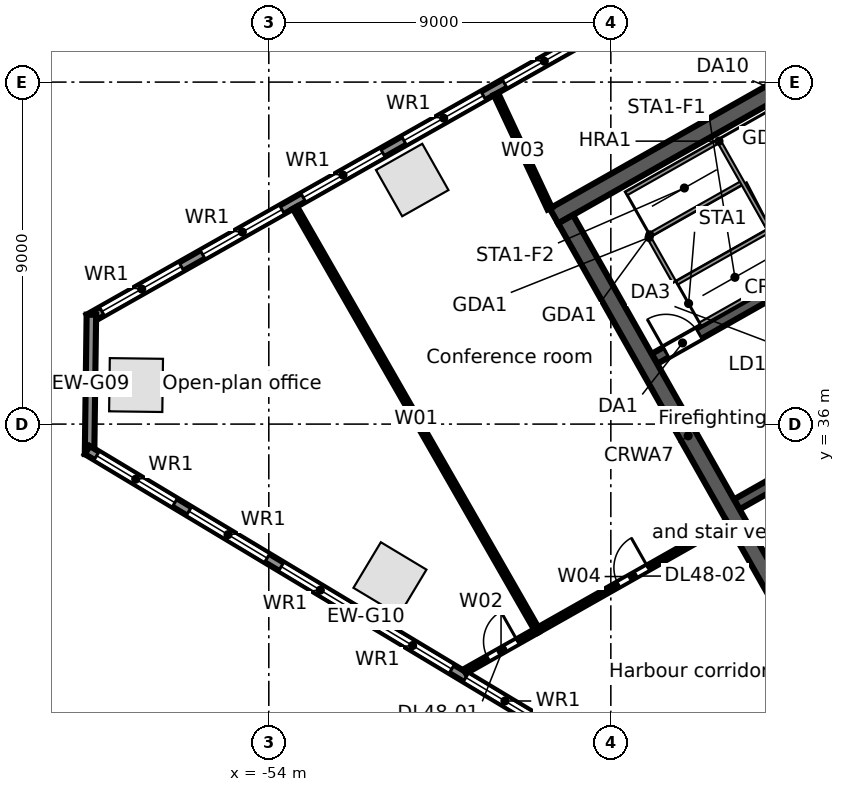
"""IFC4 building model, lengths in metres.
Left out: names, types, materials, properties, quantities, classifications, styles, units other than length and angle.
Written with IfcOpenShell. Run it as: python <this file> out.ifc"""

import sys

from ifc_helpers import new_model, si_unit, direction, frame, frame_2d, origin, origin_2d, place, context, subcontext, project, spatial, rectangle, extrude, element, fill, save


model = new_model("IFC4")
c1 = context("Model", 3, precision=1e-05, world=origin(), true_north=direction((0.0, 1.0)))
c2 = subcontext(c1, "Body", "Model", "MODEL_VIEW")
j1 = project(units=[si_unit("LENGTHUNIT", "METRE"), si_unit("PLANEANGLEUNIT", "RADIAN")], contexts=[c1])
p1 = place(None, origin())
s1 = spatial("IfcSite", under=j1, at=p1, CompositionType="ELEMENT")
p2 = place(p1, origin())
s2 = spatial("IfcBuilding", under=s1, at=p2, CompositionType="ELEMENT")
p3 = place(p2, frame((0.0, 0.0, 227.0)))
s3 = spatial("IfcBuildingStorey", under=s2, at=p3, CompositionType="ELEMENT", Elevation=227.0)
for number, where, z_axis, x_axis in (
    (1, (-50.226, 42.423, 0.0), (0.0, 0.0, 1.0), (-0.87, -0.492, 0.0)),
    (2, (-57.493, 37.027, 0.0), (0.0, 0.0, 1.0), (-0.013, -1.0, 0.0)),
    (3, (-50.812, 31.931, 0.0), (0.0, 0.0, 1.0), (0.857, -0.515, 0.0)),
):
    element("IfcColumn", number, at=place(p3, frame(where, z_axis=z_axis, x_axis=x_axis)), inside=s3, PredefinedType="COLUMN", context=c2, shape_type="SweptSolid", body=[
        extrude(rectangle(XDim=1.4, YDim=1.4, at=origin_2d()), origin(), (0.0, 0.0, 1.0), 3.9),
    ])
p4 = place(p3, frame((-58.732, 38.771, 0.0), z_axis=(0.0, 0.0, 1.0), x_axis=(0.870354824205, 0.492425100887, 0.0)))
e4 = element("IfcWall", 4, at=p4, inside=s3, PredefinedType="STANDARD", context=c2, shape_type="SweptSolid", body=[
    extrude(rectangle(XDim=64.006, YDim=0.25, at=frame_2d((32.003, 0.0))), origin(), (0.0, 0.0, 1.0), 3.55),
])
p5 = place(p4, frame((61.259, 0.0, 0.8)))
e5 = element("IfcOpeningElement", 5, at=p5, cuts=e4, PredefinedType="OPENING", context=c2, shape_type="SweptSolid", body=[
    extrude(rectangle(XDim=2.4, YDim=2.2, at=frame_2d((1.2, 1.1))), frame((0.0, 0.135, 0.0), z_axis=(0.0, -1.0, 0.0), x_axis=(1.0, 0.0, 0.0)), (0.0, 0.0, 1.0), 0.27),
])
p6 = place(p4, frame((58.216, 0.0, 0.8)))
e6 = element("IfcOpeningElement", 6, at=p6, cuts=e4, PredefinedType="OPENING", context=c2, shape_type="SweptSolid", body=[
    extrude(rectangle(XDim=2.4, YDim=2.2, at=frame_2d((1.2, 1.1))), frame((0.0, 0.135, 0.0), z_axis=(0.0, -1.0, 0.0), x_axis=(1.0, 0.0, 0.0)), (0.0, 0.0, 1.0), 0.27),
])
p7 = place(p4, frame((55.173, 0.0, 0.8)))
e7 = element("IfcOpeningElement", 7, at=p7, cuts=e4, PredefinedType="OPENING", context=c2, shape_type="SweptSolid", body=[
    extrude(rectangle(XDim=2.4, YDim=2.2, at=frame_2d((1.2, 1.1))), frame((0.0, 0.135, 0.0), z_axis=(0.0, -1.0, 0.0), x_axis=(1.0, 0.0, 0.0)), (0.0, 0.0, 1.0), 0.27),
])
p8 = place(p4, frame((52.129, 0.0, 0.8)))
e8 = element("IfcOpeningElement", 8, at=p8, cuts=e4, PredefinedType="OPENING", context=c2, shape_type="SweptSolid", body=[
    extrude(rectangle(XDim=2.4, YDim=2.2, at=frame_2d((1.2, 1.1))), frame((0.0, 0.135, 0.0), z_axis=(0.0, -1.0, 0.0), x_axis=(1.0, 0.0, 0.0)), (0.0, 0.0, 1.0), 0.27),
])
p9 = place(p4, frame((49.086, 0.0, 0.8)))
e9 = element("IfcOpeningElement", 9, at=p9, cuts=e4, PredefinedType="OPENING", context=c2, shape_type="SweptSolid", body=[
    extrude(rectangle(XDim=2.4, YDim=2.2, at=frame_2d((1.2, 1.1))), frame((0.0, 0.135, 0.0), z_axis=(0.0, -1.0, 0.0), x_axis=(1.0, 0.0, 0.0)), (0.0, 0.0, 1.0), 0.27),
])
p10 = place(p4, frame((46.043, 0.0, 0.8)))
e10 = element("IfcOpeningElement", 10, at=p10, cuts=e4, PredefinedType="OPENING", context=c2, shape_type="SweptSolid", body=[
    extrude(rectangle(XDim=2.4, YDim=2.2, at=frame_2d((1.2, 1.1))), frame((0.0, 0.135, 0.0), z_axis=(0.0, -1.0, 0.0), x_axis=(1.0, 0.0, 0.0)), (0.0, 0.0, 1.0), 0.27),
])
p11 = place(p4, frame((43.0, 0.0, 0.8)))
e11 = element("IfcOpeningElement", 11, at=p11, cuts=e4, PredefinedType="OPENING", context=c2, shape_type="SweptSolid", body=[
    extrude(rectangle(XDim=2.4, YDim=2.2, at=frame_2d((1.2, 1.1))), frame((0.0, 0.135, 0.0), z_axis=(0.0, -1.0, 0.0), x_axis=(1.0, 0.0, 0.0)), (0.0, 0.0, 1.0), 0.27),
])
p12 = place(p4, frame((39.956, 0.0, 0.8)))
e12 = element("IfcOpeningElement", 12, at=p12, cuts=e4, PredefinedType="OPENING", context=c2, shape_type="SweptSolid", body=[
    extrude(rectangle(XDim=2.4, YDim=2.2, at=frame_2d((1.2, 1.1))), frame((0.0, 0.135, 0.0), z_axis=(0.0, -1.0, 0.0), x_axis=(1.0, 0.0, 0.0)), (0.0, 0.0, 1.0), 0.27),
])
p13 = place(p4, frame((36.913, 0.0, 0.8)))
e13 = element("IfcOpeningElement", 13, at=p13, cuts=e4, PredefinedType="OPENING", context=c2, shape_type="SweptSolid", body=[
    extrude(rectangle(XDim=2.4, YDim=2.2, at=frame_2d((1.2, 1.1))), frame((0.0, 0.135, 0.0), z_axis=(0.0, -1.0, 0.0), x_axis=(1.0, 0.0, 0.0)), (0.0, 0.0, 1.0), 0.27),
])
p14 = place(p4, frame((33.87, 0.0, 0.8)))
e14 = element("IfcOpeningElement", 14, at=p14, cuts=e4, PredefinedType="OPENING", context=c2, shape_type="SweptSolid", body=[
    extrude(rectangle(XDim=2.4, YDim=2.2, at=frame_2d((1.2, 1.1))), frame((0.0, 0.135, 0.0), z_axis=(0.0, -1.0, 0.0), x_axis=(1.0, 0.0, 0.0)), (0.0, 0.0, 1.0), 0.27),
])
p15 = place(p4, frame((30.826, 0.0, 0.8)))
e15 = element("IfcOpeningElement", 15, at=p15, cuts=e4, PredefinedType="OPENING", context=c2, shape_type="SweptSolid", body=[
    extrude(rectangle(XDim=2.4, YDim=2.2, at=frame_2d((1.2, 1.1))), frame((0.0, 0.135, 0.0), z_axis=(0.0, -1.0, 0.0), x_axis=(1.0, 0.0, 0.0)), (0.0, 0.0, 1.0), 0.27),
])
p16 = place(p4, frame((27.783, 0.0, 0.8)))
e16 = element("IfcOpeningElement", 16, at=p16, cuts=e4, PredefinedType="OPENING", context=c2, shape_type="SweptSolid", body=[
    extrude(rectangle(XDim=2.4, YDim=2.2, at=frame_2d((1.2, 1.1))), frame((0.0, 0.135, 0.0), z_axis=(0.0, -1.0, 0.0), x_axis=(1.0, 0.0, 0.0)), (0.0, 0.0, 1.0), 0.27),
])
p17 = place(p4, frame((24.74, 0.0, 0.8)))
e17 = element("IfcOpeningElement", 17, at=p17, cuts=e4, PredefinedType="OPENING", context=c2, shape_type="SweptSolid", body=[
    extrude(rectangle(XDim=2.4, YDim=2.2, at=frame_2d((1.2, 1.1))), frame((0.0, 0.135, 0.0), z_axis=(0.0, -1.0, 0.0), x_axis=(1.0, 0.0, 0.0)), (0.0, 0.0, 1.0), 0.27),
])
p18 = place(p4, frame((21.696, 0.0, 0.8)))
e18 = element("IfcOpeningElement", 18, at=p18, cuts=e4, PredefinedType="OPENING", context=c2, shape_type="SweptSolid", body=[
    extrude(rectangle(XDim=2.4, YDim=2.2, at=frame_2d((1.2, 1.1))), frame((0.0, 0.135, 0.0), z_axis=(0.0, -1.0, 0.0), x_axis=(1.0, 0.0, 0.0)), (0.0, 0.0, 1.0), 0.27),
])
p19 = place(p4, frame((18.653, 0.0, 0.8)))
e19 = element("IfcOpeningElement", 19, at=p19, cuts=e4, PredefinedType="OPENING", context=c2, shape_type="SweptSolid", body=[
    extrude(rectangle(XDim=2.4, YDim=2.2, at=frame_2d((1.2, 1.1))), frame((0.0, 0.135, 0.0), z_axis=(0.0, -1.0, 0.0), x_axis=(1.0, 0.0, 0.0)), (0.0, 0.0, 1.0), 0.27),
])
p20 = place(p4, frame((15.61, 0.0, 0.8)))
e20 = element("IfcOpeningElement", 20, at=p20, cuts=e4, PredefinedType="OPENING", context=c2, shape_type="SweptSolid", body=[
    extrude(rectangle(XDim=2.4, YDim=2.2, at=frame_2d((1.2, 1.1))), frame((0.0, 0.135, 0.0), z_axis=(0.0, -1.0, 0.0), x_axis=(1.0, 0.0, 0.0)), (0.0, 0.0, 1.0), 0.27),
])
p21 = place(p4, frame((12.567, 0.0, 0.8)))
e21 = element("IfcOpeningElement", 21, at=p21, cuts=e4, PredefinedType="OPENING", context=c2, shape_type="SweptSolid", body=[
    extrude(rectangle(XDim=2.4, YDim=2.2, at=frame_2d((1.2, 1.1))), frame((0.0, 0.135, 0.0), z_axis=(0.0, -1.0, 0.0), x_axis=(1.0, 0.0, 0.0)), (0.0, 0.0, 1.0), 0.27),
])
p22 = place(p4, frame((9.523, 0.0, 0.8)))
e22 = element("IfcOpeningElement", 22, at=p22, cuts=e4, PredefinedType="OPENING", context=c2, shape_type="SweptSolid", body=[
    extrude(rectangle(XDim=2.4, YDim=2.2, at=frame_2d((1.2, 1.1))), frame((0.0, 0.135, 0.0), z_axis=(0.0, -1.0, 0.0), x_axis=(1.0, 0.0, 0.0)), (0.0, 0.0, 1.0), 0.27),
])
p23 = place(p4, frame((6.48, 0.0, 0.8)))
e23 = element("IfcOpeningElement", 23, at=p23, cuts=e4, PredefinedType="OPENING", context=c2, shape_type="SweptSolid", body=[
    extrude(rectangle(XDim=2.4, YDim=2.2, at=frame_2d((1.2, 1.1))), frame((0.0, 0.135, 0.0), z_axis=(0.0, -1.0, 0.0), x_axis=(1.0, 0.0, 0.0)), (0.0, 0.0, 1.0), 0.27),
])
p24 = place(p4, frame((3.437, 0.0, 0.8)))
e24 = element("IfcOpeningElement", 24, at=p24, cuts=e4, PredefinedType="OPENING", context=c2, shape_type="SweptSolid", body=[
    extrude(rectangle(XDim=2.4, YDim=2.2, at=frame_2d((1.2, 1.1))), frame((0.0, 0.135, 0.0), z_axis=(0.0, -1.0, 0.0), x_axis=(1.0, 0.0, 0.0)), (0.0, 0.0, 1.0), 0.27),
])
p25 = place(p4, frame((0.393, 0.0, 0.8)))
e25 = element("IfcOpeningElement", 25, at=p25, cuts=e4, PredefinedType="OPENING", context=c2, shape_type="SweptSolid", body=[
    extrude(rectangle(XDim=2.4, YDim=2.2, at=frame_2d((1.2, 1.1))), frame((0.0, 0.135, 0.0), z_axis=(0.0, -1.0, 0.0), x_axis=(1.0, 0.0, 0.0)), (0.0, 0.0, 1.0), 0.27),
])
p26 = place(p3, frame((-58.717, 35.208, 0.0), z_axis=(0.0, 0.0, 1.0), x_axis=(0.01310512158, 0.999914124207, 0.0)))
e26 = element("IfcWall", 26, at=p26, inside=s3, PredefinedType="STANDARD", context=c2, shape_type="SweptSolid", body=[
    extrude(rectangle(XDim=3.67, YDim=0.25, at=frame_2d((1.835, 0.0))), origin(), (0.0, 0.0, 1.0), 3.55),
])
p27 = place(p3, frame((-44.115, 26.507, 0.0), z_axis=(0.0, 0.0, 1.0), x_axis=(-0.857166583633, 0.515039268311, 0.0)))
e27 = element("IfcWall", 27, at=p27, inside=s3, PredefinedType="STANDARD", context=c2, shape_type="SweptSolid", body=[
    extrude(rectangle(XDim=17.106, YDim=0.25, at=frame_2d((8.553, 0.0))), origin(), (0.0, 0.0, 1.0), 3.55),
])
p28 = place(p27, frame((14.417, 0.0, 0.8)))
e28 = element("IfcOpeningElement", 28, at=p28, cuts=e27, PredefinedType="OPENING", context=c2, shape_type="SweptSolid", body=[
    extrude(rectangle(XDim=2.4, YDim=2.2, at=frame_2d((1.2, 1.1))), frame((0.0, 0.135, 0.0), z_axis=(0.0, -1.0, 0.0), x_axis=(1.0, 0.0, 0.0)), (0.0, 0.0, 1.0), 0.27),
])
p29 = place(p27, frame((11.584, 0.0, 0.8)))
e29 = element("IfcOpeningElement", 29, at=p29, cuts=e27, PredefinedType="OPENING", context=c2, shape_type="SweptSolid", body=[
    extrude(rectangle(XDim=2.4, YDim=2.2, at=frame_2d((1.2, 1.1))), frame((0.0, 0.135, 0.0), z_axis=(0.0, -1.0, 0.0), x_axis=(1.0, 0.0, 0.0)), (0.0, 0.0, 1.0), 0.27),
])
p30 = place(p27, frame((8.75, 0.0, 0.8)))
e30 = element("IfcOpeningElement", 30, at=p30, cuts=e27, PredefinedType="OPENING", context=c2, shape_type="SweptSolid", body=[
    extrude(rectangle(XDim=2.4, YDim=2.2, at=frame_2d((1.2, 1.1))), frame((0.0, 0.135, 0.0), z_axis=(0.0, -1.0, 0.0), x_axis=(1.0, 0.0, 0.0)), (0.0, 0.0, 1.0), 0.27),
])
p31 = place(p27, frame((5.917, 0.0, 0.8)))
e31 = element("IfcOpeningElement", 31, at=p31, cuts=e27, PredefinedType="OPENING", context=c2, shape_type="SweptSolid", body=[
    extrude(rectangle(XDim=2.4, YDim=2.2, at=frame_2d((1.2, 1.1))), frame((0.0, 0.135, 0.0), z_axis=(0.0, -1.0, 0.0), x_axis=(1.0, 0.0, 0.0)), (0.0, 0.0, 1.0), 0.27),
])
p32 = place(p27, frame((3.084, 0.0, 0.8)))
e32 = element("IfcOpeningElement", 32, at=p32, cuts=e27, PredefinedType="OPENING", context=c2, shape_type="SweptSolid", body=[
    extrude(rectangle(XDim=2.4, YDim=2.2, at=frame_2d((1.2, 1.1))), frame((0.0, 0.135, 0.0), z_axis=(0.0, -1.0, 0.0), x_axis=(1.0, 0.0, 0.0)), (0.0, 0.0, 1.0), 0.27),
])
p33 = place(p27, frame((0.25, 0.0, 0.8)))
e33 = element("IfcOpeningElement", 33, at=p33, cuts=e27, PredefinedType="OPENING", context=c2, shape_type="SweptSolid", body=[
    extrude(rectangle(XDim=2.4, YDim=2.2, at=frame_2d((1.2, 1.1))), frame((0.0, 0.135, 0.0), z_axis=(0.0, -1.0, 0.0), x_axis=(1.0, 0.0, 0.0)), (0.0, 0.0, 1.0), 0.27),
])
p34 = place(p3, frame((-41.687, 33.887, 0.0), z_axis=(0.0, 0.0, 1.0), x_axis=(0.870355736587, 0.49242348826, 0.0)))
e34 = element("IfcWall", 34, at=p34, inside=s3, PredefinedType="SOLIDWALL", context=c2, shape_type="SweptSolid", body=[
    extrude(rectangle(XDim=6.15, YDim=0.3, at=frame_2d((3.075, 0.0))), origin(), (0.0, 0.0, 1.0), 3.55),
])
p35 = place(p34, frame((1.25, 0.0, 0.0)))
e35 = element("IfcOpeningElement", 35, at=p35, cuts=e34, PredefinedType="OPENING", context=c2, shape_type="SweptSolid", body=[
    extrude(rectangle(XDim=1.1, YDim=2.1, at=frame_2d((0.55, 1.05))), frame((0.0, 0.16, 0.0), z_axis=(0.0, -1.0, 0.0), x_axis=(1.0, 0.0, 0.0)), (0.0, 0.0, 1.0), 0.32),
])
p36 = place(p34, frame((4.4, 0.0, 0.0)))
e36 = element("IfcOpeningElement", 36, at=p36, cuts=e34, PredefinedType="OPENING", context=c2, shape_type="SweptSolid", body=[
    extrude(rectangle(XDim=1.1, YDim=2.1, at=frame_2d((0.55, 1.05))), frame((0.0, 0.16, 0.0), z_axis=(0.0, -1.0, 0.0), x_axis=(1.0, 0.0, 0.0)), (0.0, 0.0, 1.0), 0.32),
])
p37 = place(p3, frame((-43.853, 37.717, 0.0), z_axis=(0.0, 0.0, 1.0), x_axis=(0.870360409231, 0.492415229297, 0.0)))
e37 = element("IfcWall", 37, at=p37, inside=s3, PredefinedType="SOLIDWALL", context=c2, shape_type="SweptSolid", body=[
    extrude(rectangle(XDim=7.55, YDim=0.3, at=frame_2d((3.775, 0.0))), origin(), (0.0, 0.0, 1.0), 3.55),
])
p38 = place(p37, frame((0.35, 0.0, 0.0)))
e38 = element("IfcOpeningElement", 38, at=p38, cuts=e37, PredefinedType="OPENING", context=c2, shape_type="SweptSolid", body=[
    extrude(rectangle(XDim=1.0, YDim=2.1, at=frame_2d((0.5, 1.05))), frame((0.0, 0.16, 0.0), z_axis=(0.0, -1.0, 0.0), x_axis=(1.0, 0.0, 0.0)), (0.0, 0.0, 1.0), 0.32),
])
p39 = place(p3, frame((-46.498, 41.477, 0.0), z_axis=(0.0, 0.0, 1.0), x_axis=(0.870359753402, 0.492416388494, 0.0)))
e39 = element("IfcWall", 39, at=p39, inside=s3, PredefinedType="SOLIDWALL", context=c2, shape_type="SweptSolid", body=[
    extrude(rectangle(XDim=17.0, YDim=0.45, at=frame_2d((8.5, 0.0))), origin(), (0.0, 0.0, 1.0), 3.55),
])
p40 = place(p3, frame((-46.191, 41.392, 0.0), z_axis=(0.0, 0.0, 1.0), x_axis=(0.492421378713, -0.870356930107, 0.0)))
e40 = element("IfcWall", 40, at=p40, inside=s3, PredefinedType="SOLIDWALL", context=c2, shape_type="SweptSolid", body=[
    extrude(rectangle(XDim=13.1, YDim=0.45, at=frame_2d((6.55, 0.0))), origin(), (0.0, 0.0, 1.0), 3.55),
])
p41 = place(p3, frame((-53.311, 41.695, 0.0), z_axis=(0.0, 0.0, 1.0), x_axis=(0.497344363303, -0.867553216979, 0.0)))
e41 = element("IfcWall", 41, at=p41, inside=s3, PredefinedType="PARTITIONING", context=c2, shape_type="SweptSolid", body=[
    extrude(rectangle(XDim=12.82, YDim=0.125, at=frame_2d((6.41, 0.0))), origin(), (0.0, 0.0, 1.0), 2.73),
])
p42 = place(p3, frame((-48.843, 29.494, 0.0), z_axis=(0.0, 0.0, 1.0), x_axis=(0.870427970258, 0.492295793799, 0.0)))
e42 = element("IfcWall", 42, at=p42, inside=s3, PredefinedType="PARTITIONING", context=c2, shape_type="SweptSolid", body=[
    extrude(rectangle(XDim=2.192, YDim=0.125, at=frame_2d((1.096, 0.0))), origin(), (0.0, 0.0, 1.0), 2.83),
])
p43 = place(p42, frame((0.7, 0.0, 0.0)))
e43 = element("IfcOpeningElement", 43, at=p43, cuts=e42, PredefinedType="OPENING", context=c2, shape_type="SweptSolid", body=[
    extrude(rectangle(XDim=0.9, YDim=2.1, at=frame_2d((0.45, 1.05))), frame((0.0, 0.073, 0.0), z_axis=(0.0, -1.0, 0.0), x_axis=(1.0, 0.0, 0.0)), (0.0, 0.0, 1.0), 0.145),
])
p44 = place(p3, frame((-48.022, 44.687, 0.0), z_axis=(0.0, 0.0, 1.0), x_axis=(0.424510917438, -0.905422818895, 0.0)))
e44 = element("IfcWall", 44, at=p44, inside=s3, PredefinedType="PARTITIONING", context=c2, shape_type="SweptSolid", body=[
    extrude(rectangle(XDim=3.329, YDim=0.125, at=frame_2d((1.665, 0.0))), origin(), (0.0, 0.0, 1.0), 2.83),
])
p45 = place(p3, frame((-46.935, 30.573, 0.0), z_axis=(0.0, 0.0, 1.0), x_axis=(0.870367427407, 0.492402824229, 0.0)))
e45 = element("IfcWall", 45, at=p45, inside=s3, PredefinedType="PARTITIONING", context=c2, shape_type="SweptSolid", body=[
    extrude(rectangle(XDim=5.75, YDim=0.125, at=frame_2d((2.875, 0.0))), origin(), (0.0, 0.0, 1.0), 3.55),
])
p46 = place(p45, frame((2.45, 0.0, 0.0)))
e46 = element("IfcOpeningElement", 46, at=p46, cuts=e45, PredefinedType="OPENING", context=c2, shape_type="SweptSolid", body=[
    extrude(rectangle(XDim=0.9, YDim=2.1, at=frame_2d((0.45, 1.05))), frame((0.0, 0.073, 0.0), z_axis=(0.0, -1.0, 0.0), x_axis=(1.0, 0.0, 0.0)), (0.0, 0.0, 1.0), 0.145),
])
p47 = place(p21, origin())
e47 = element("IfcWindow", 47, at=p47, inside=s3, PartitioningType="SINGLE_PANEL", PredefinedType="WINDOW", context=c2, shape_type="SweptSolid", body=[
    extrude(rectangle(XDim=2.4, YDim=2.2, at=frame_2d((1.2, 1.1))), frame((0.0, 0.03, 0.0), z_axis=(0.0, -1.0, 0.0), x_axis=(1.0, 0.0, 0.0)), (0.0, 0.0, 1.0), 0.06),
])
fill(e21, e47)
p48 = place(p22, origin())
e48 = element("IfcWindow", 48, at=p48, inside=s3, PartitioningType="SINGLE_PANEL", PredefinedType="WINDOW", context=c2, shape_type="SweptSolid", body=[
    extrude(rectangle(XDim=2.4, YDim=2.2, at=frame_2d((1.2, 1.1))), frame((0.0, 0.03, 0.0), z_axis=(0.0, -1.0, 0.0), x_axis=(1.0, 0.0, 0.0)), (0.0, 0.0, 1.0), 0.06),
])
fill(e22, e48)
p49 = place(p23, origin())
e49 = element("IfcWindow", 49, at=p49, inside=s3, PartitioningType="SINGLE_PANEL", PredefinedType="WINDOW", context=c2, shape_type="SweptSolid", body=[
    extrude(rectangle(XDim=2.4, YDim=2.2, at=frame_2d((1.2, 1.1))), frame((0.0, 0.03, 0.0), z_axis=(0.0, -1.0, 0.0), x_axis=(1.0, 0.0, 0.0)), (0.0, 0.0, 1.0), 0.06),
])
fill(e23, e49)
p50 = place(p24, origin())
e50 = element("IfcWindow", 50, at=p50, inside=s3, PartitioningType="SINGLE_PANEL", PredefinedType="WINDOW", context=c2, shape_type="SweptSolid", body=[
    extrude(rectangle(XDim=2.4, YDim=2.2, at=frame_2d((1.2, 1.1))), frame((0.0, 0.03, 0.0), z_axis=(0.0, -1.0, 0.0), x_axis=(1.0, 0.0, 0.0)), (0.0, 0.0, 1.0), 0.06),
])
fill(e24, e50)
p51 = place(p25, origin())
e51 = element("IfcWindow", 51, at=p51, inside=s3, PartitioningType="SINGLE_PANEL", PredefinedType="WINDOW", context=c2, shape_type="SweptSolid", body=[
    extrude(rectangle(XDim=2.4, YDim=2.2, at=frame_2d((1.2, 1.1))), frame((0.0, 0.03, 0.0), z_axis=(0.0, -1.0, 0.0), x_axis=(1.0, 0.0, 0.0)), (0.0, 0.0, 1.0), 0.06),
])
fill(e25, e51)
p52 = place(p28, origin())
e52 = element("IfcWindow", 52, at=p52, inside=s3, PartitioningType="SINGLE_PANEL", PredefinedType="WINDOW", context=c2, shape_type="SweptSolid", body=[
    extrude(rectangle(XDim=2.4, YDim=2.2, at=frame_2d((1.2, 1.1))), frame((0.0, 0.03, 0.0), z_axis=(0.0, -1.0, 0.0), x_axis=(1.0, 0.0, 0.0)), (0.0, 0.0, 1.0), 0.06),
])
fill(e28, e52)
p53 = place(p29, origin())
e53 = element("IfcWindow", 53, at=p53, inside=s3, PartitioningType="SINGLE_PANEL", PredefinedType="WINDOW", context=c2, shape_type="SweptSolid", body=[
    extrude(rectangle(XDim=2.4, YDim=2.2, at=frame_2d((1.2, 1.1))), frame((0.0, 0.03, 0.0), z_axis=(0.0, -1.0, 0.0), x_axis=(1.0, 0.0, 0.0)), (0.0, 0.0, 1.0), 0.06),
])
fill(e29, e53)
p54 = place(p30, origin())
e54 = element("IfcWindow", 54, at=p54, inside=s3, PartitioningType="SINGLE_PANEL", PredefinedType="WINDOW", context=c2, shape_type="SweptSolid", body=[
    extrude(rectangle(XDim=2.4, YDim=2.2, at=frame_2d((1.2, 1.1))), frame((0.0, 0.03, 0.0), z_axis=(0.0, -1.0, 0.0), x_axis=(1.0, 0.0, 0.0)), (0.0, 0.0, 1.0), 0.06),
])
fill(e30, e54)
p55 = place(p31, origin())
e55 = element("IfcWindow", 55, at=p55, inside=s3, PartitioningType="SINGLE_PANEL", PredefinedType="WINDOW", context=c2, shape_type="SweptSolid", body=[
    extrude(rectangle(XDim=2.4, YDim=2.2, at=frame_2d((1.2, 1.1))), frame((0.0, 0.03, 0.0), z_axis=(0.0, -1.0, 0.0), x_axis=(1.0, 0.0, 0.0)), (0.0, 0.0, 1.0), 0.06),
])
fill(e31, e55)
p56 = place(p32, origin())
e56 = element("IfcWindow", 56, at=p56, inside=s3, PartitioningType="SINGLE_PANEL", PredefinedType="WINDOW", context=c2, shape_type="SweptSolid", body=[
    extrude(rectangle(XDim=2.4, YDim=2.2, at=frame_2d((1.2, 1.1))), frame((0.0, 0.03, 0.0), z_axis=(0.0, -1.0, 0.0), x_axis=(1.0, 0.0, 0.0)), (0.0, 0.0, 1.0), 0.06),
])
fill(e32, e56)
p57 = place(p38, origin())
e57 = element("IfcDoor", 57, at=p57, inside=s3, OperationType="SINGLE_SWING_LEFT", PredefinedType="DOOR", context=c2, shape_type="SweptSolid", body=[
    extrude(rectangle(XDim=1.0, YDim=2.1, at=frame_2d((0.5, 1.05))), frame((0.0, 0.025, 0.0), z_axis=(0.0, -1.0, 0.0), x_axis=(1.0, 0.0, 0.0)), (0.0, 0.0, 1.0), 0.05),
])
fill(e38, e57)
p58 = place(p43, origin())
e58 = element("IfcDoor", 58, at=p58, inside=s3, OperationType="SINGLE_SWING_RIGHT", PredefinedType="DOOR", context=c2, shape_type="SweptSolid", body=[
    extrude(rectangle(XDim=0.9, YDim=2.1, at=frame_2d((0.45, 1.05))), frame((0.0, 0.025, 0.0), z_axis=(0.0, -1.0, 0.0), x_axis=(1.0, 0.0, 0.0)), (0.0, 0.0, 1.0), 0.05),
])
fill(e43, e58)
p59 = place(p46, origin())
e59 = element("IfcDoor", 59, at=p59, inside=s3, OperationType="SINGLE_SWING_RIGHT", PredefinedType="DOOR", context=c2, shape_type="SweptSolid", body=[
    extrude(rectangle(XDim=0.9, YDim=2.1, at=frame_2d((0.45, 1.05))), frame((0.0, 0.025, 0.0), z_axis=(0.0, -1.0, 0.0), x_axis=(1.0, 0.0, 0.0)), (0.0, 0.0, 1.0), 0.05),
])
fill(e46, e59)
save(model, sys.argv[1])
